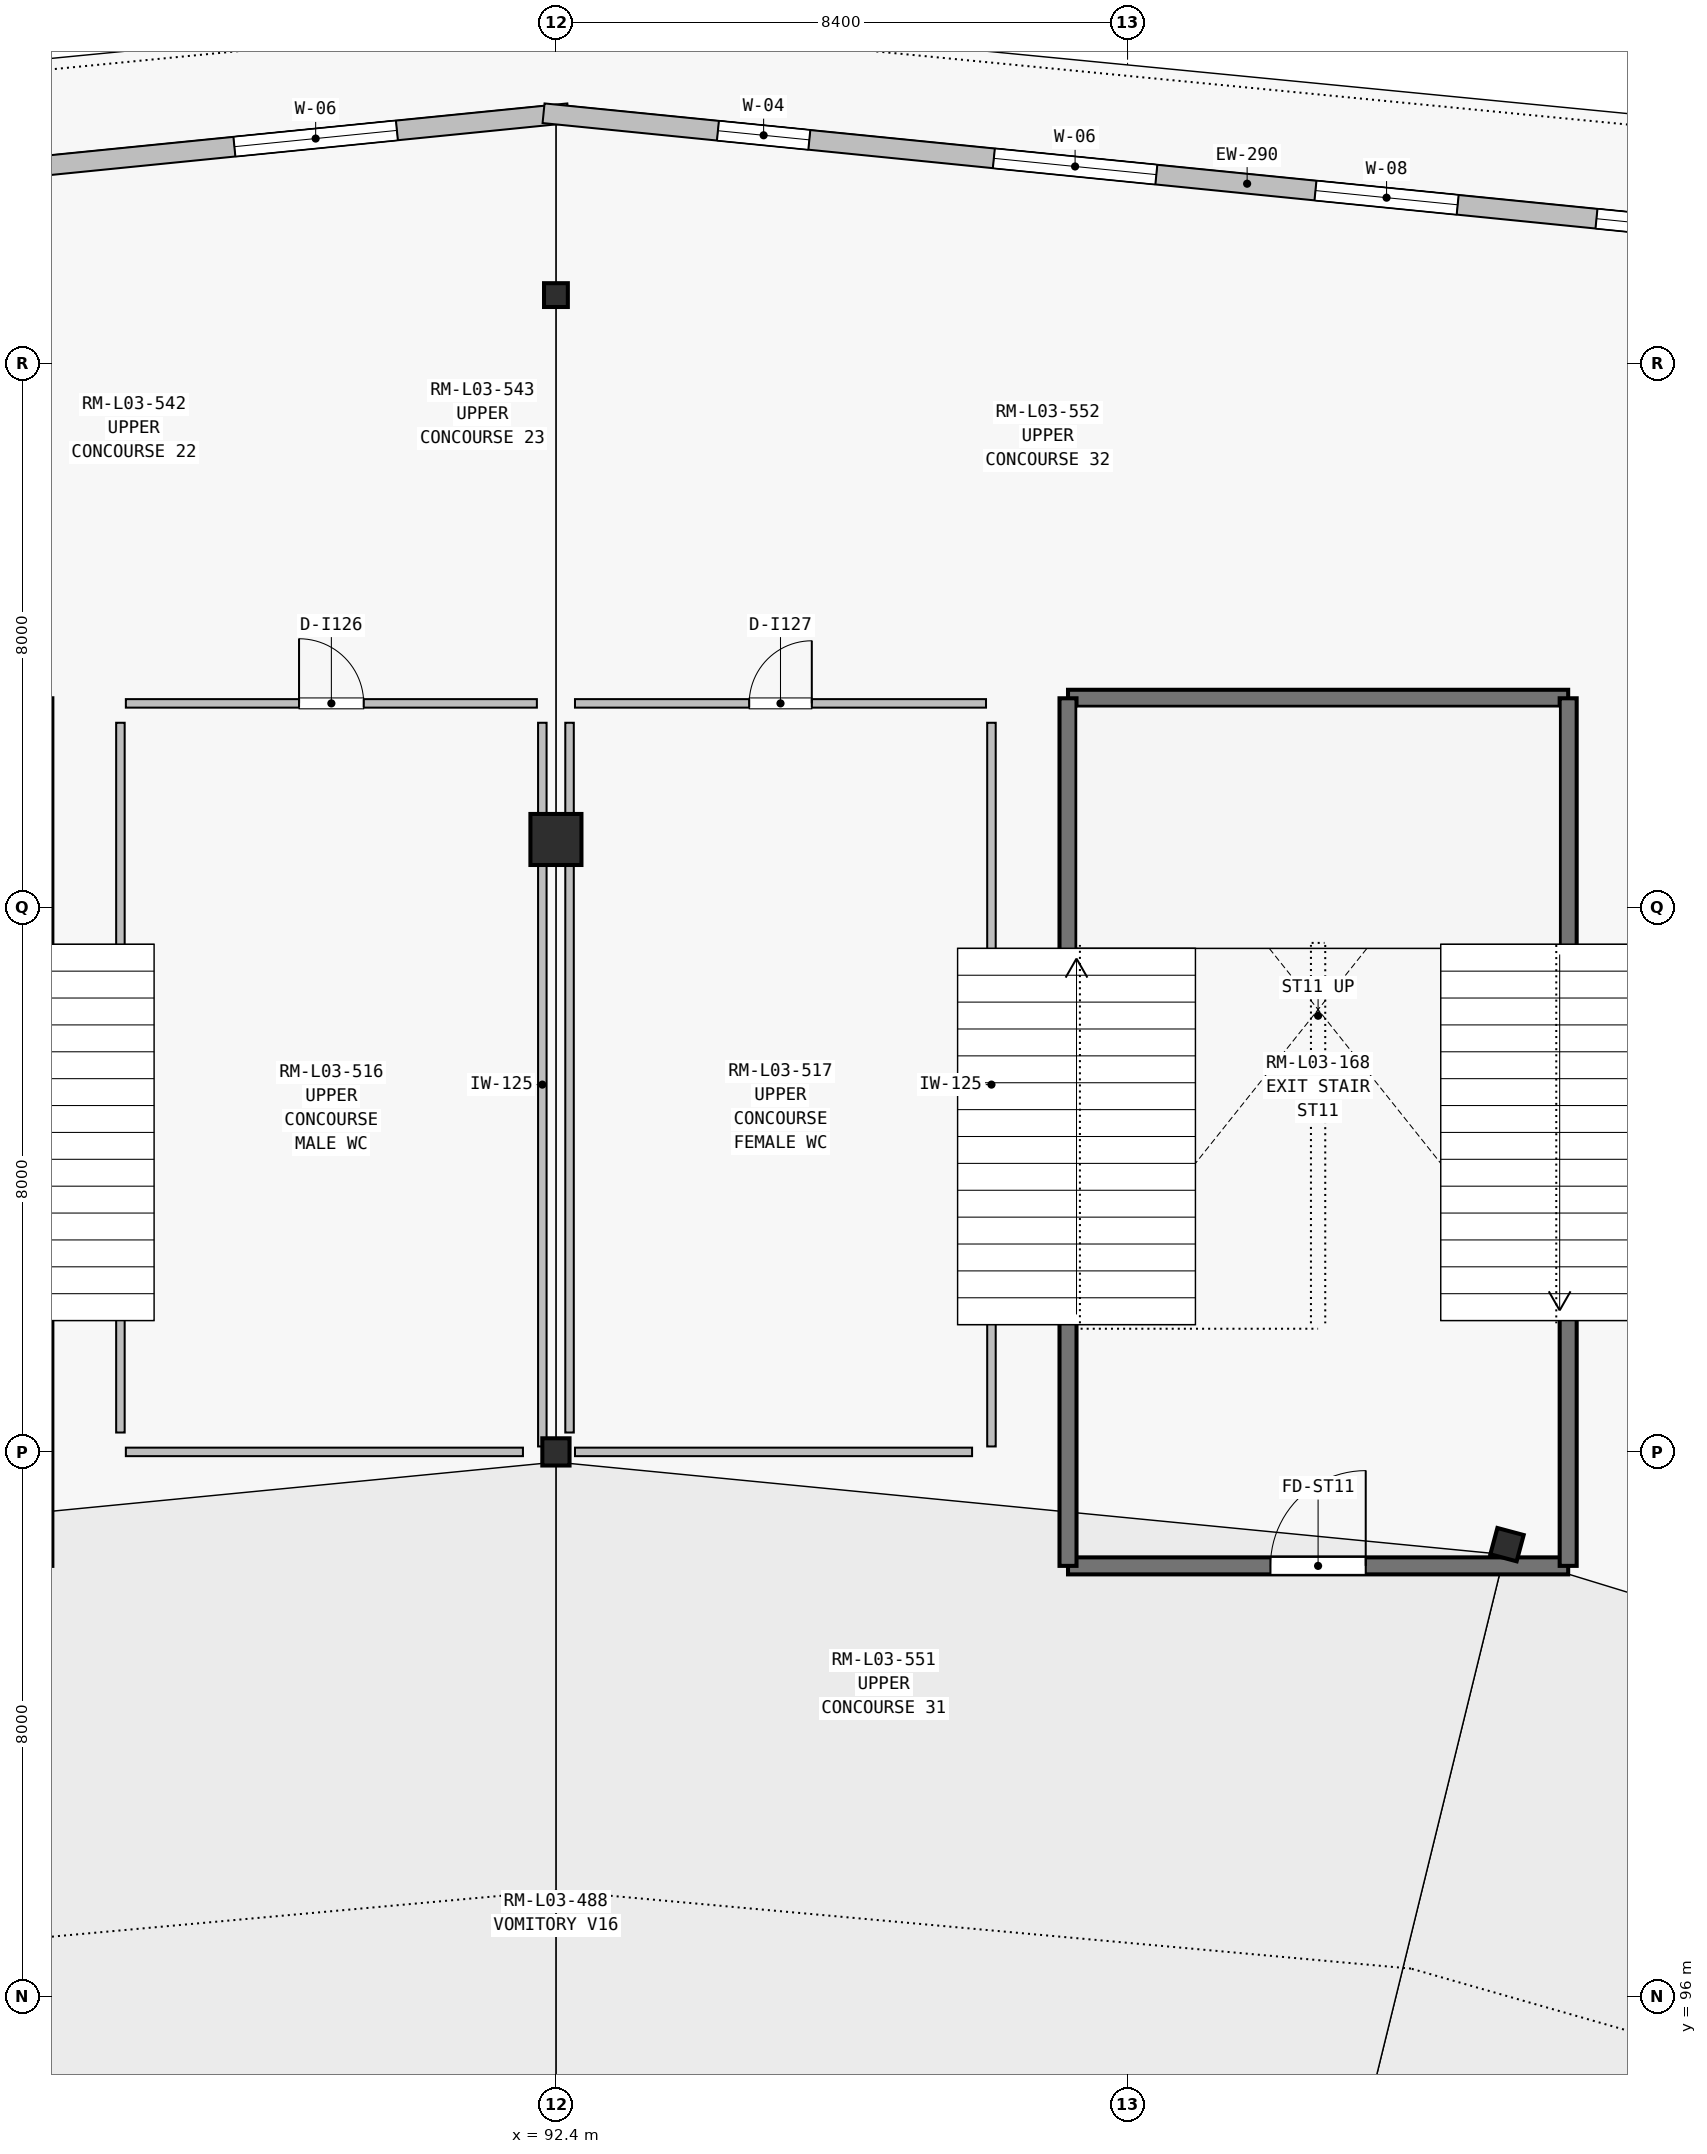
"""IFC4 building model, lengths in metres.
Left out: names, types, materials, properties, quantities, classifications, styles, units other than length and angle.
Written with IfcOpenShell. Run it as: python <this file> out.ifc"""

import sys

from ifc_helpers import new_model, si_unit, direction, frame, frame_2d, origin, origin_2d, place, context, subcontext, project, spatial, rectangle, i_section, extrude, element, fill, save


model = new_model("IFC4")
c1 = context("Model", 3, precision=1e-05, world=origin(), true_north=direction((0.0, 1.0)))
c2 = subcontext(c1, "Body", "Model", "MODEL_VIEW")
j1 = project(units=[si_unit("LENGTHUNIT", "METRE"), si_unit("PLANEANGLEUNIT", "RADIAN")], contexts=[c1])
p1 = place(None, origin())
s1 = spatial("IfcSite", under=j1, at=p1, CompositionType="ELEMENT")
p2 = place(p1, origin())
s2 = spatial("IfcBuilding", under=s1, at=p2, CompositionType="ELEMENT")
p3 = place(p2, frame((0.0, 0.0, 14.4)))
s3 = spatial("IfcBuildingStorey", under=s2, at=p3, CompositionType="ELEMENT", Elevation=14.4)
for number, where, z_axis, x_axis in (
    (1, (106.376, 102.637, 0.0), (0.0, 0.0, 1.0), (0.259, 0.966, 0.0)),
    (2, (92.4, 104.0, 0.0), (0.0, 0.0, 1.0), (0.0, 1.0, 0.0)),
):
    element("IfcColumn", number, at=place(p3, frame(where, z_axis=z_axis, x_axis=x_axis)), inside=s3, PredefinedType="COLUMN", context=c2, shape_type="SweptSolid", body=[
        extrude(i_section(OverallWidth=0.4, OverallDepth=0.4, WebThickness=0.016, FlangeThickness=0.028, at=origin_2d()), origin(), (0.0, 0.0, 1.0), 4.5),
    ])
p4 = place(p3, frame((92.4, 113.0, 0.0), z_axis=(0.0, 0.0, 1.0), x_axis=(0.0, 1.0, 0.0)))
e3 = element("IfcColumn", 3, at=p4, inside=s3, PredefinedType="COLUMN", context=c2, shape_type="SweptSolid", body=[
    extrude(rectangle(XDim=0.75, YDim=0.75, at=origin_2d()), origin(), (0.0, 0.0, 1.0), 4.5),
])
p5 = place(p3, frame((92.4, 121.0, 0.0), z_axis=(0.0, 0.0, 1.0), x_axis=(0.0, 1.0, 0.0)))
e4 = element("IfcColumn", 4, at=p5, inside=s3, PredefinedType="COLUMN", context=c2, shape_type="SweptSolid", body=[
    extrude(i_section(OverallWidth=0.35, OverallDepth=0.35, WebThickness=0.014, FlangeThickness=0.024, at=origin_2d()), origin(), (0.0, 0.0, 1.0), 4.5),
])
p6 = place(p3, frame((71.904, 121.601, 0.0), z_axis=(0.0, 0.0, 1.0), x_axis=(0.995020542998, 0.099670050731, 0.0)))
e5 = element("IfcWall", 5, at=p6, inside=s3, PredefinedType="SOLIDWALL", context=c2, shape_type="SweptSolid", body=[
    extrude(rectangle(XDim=20.781, YDim=0.29, at=frame_2d((10.391, 0.0))), origin(), (0.0, 0.0, 1.0), 4.26),
])
p7 = place(p6, frame((2.525, 0.0, 0.9)))
e6 = element("IfcOpeningElement", 6, at=p7, cuts=e5, PredefinedType="OPENING", context=c2, shape_type="SweptSolid", body=[
    extrude(rectangle(XDim=1.45, YDim=1.4, at=frame_2d((0.725, 0.7))), frame((0.0, 0.155, 0.0), z_axis=(0.0, -1.0, 0.0), x_axis=(1.0, 0.0, 0.0)), (0.0, 0.0, 1.0), 0.31),
])
p8 = place(p6, frame((7.025, 0.0, 0.75)))
e7 = element("IfcOpeningElement", 7, at=p8, cuts=e5, PredefinedType="OPENING", context=c2, shape_type="SweptSolid", body=[
    extrude(rectangle(XDim=1.65, YDim=2.4, at=frame_2d((0.825, 1.2))), frame((0.0, 0.155, 0.0), z_axis=(0.0, -1.0, 0.0), x_axis=(1.0, 0.0, 0.0)), (0.0, 0.0, 1.0), 0.31),
])
p9 = place(p6, frame((11.775, 0.0, 0.75)))
e8 = element("IfcOpeningElement", 8, at=p9, cuts=e5, PredefinedType="OPENING", context=c2, shape_type="SweptSolid", body=[
    extrude(rectangle(XDim=1.35, YDim=2.3, at=frame_2d((0.675, 1.15))), frame((0.0, 0.155, 0.0), z_axis=(0.0, -1.0, 0.0), x_axis=(1.0, 0.0, 0.0)), (0.0, 0.0, 1.0), 0.31),
])
p10 = place(p6, frame((15.85, 0.0, 0.9)))
e9 = element("IfcOpeningElement", 9, at=p10, cuts=e5, PredefinedType="OPENING", context=c2, shape_type="SweptSolid", body=[
    extrude(rectangle(XDim=2.4, YDim=2.1, at=frame_2d((1.2, 1.05))), frame((0.0, 0.155, 0.0), z_axis=(0.0, -1.0, 0.0), x_axis=(1.0, 0.0, 0.0)), (0.0, 0.0, 1.0), 0.31),
])
p11 = place(p3, frame((92.218, 123.673, 0.0), z_axis=(0.0, 0.0, 1.0), x_axis=(0.995020426289, -0.099671215838, 0.0)))
e10 = element("IfcWall", 10, at=p11, inside=s3, PredefinedType="SOLIDWALL", context=c2, shape_type="SweptSolid", body=[
    extrude(rectangle(XDim=20.781, YDim=0.29, at=frame_2d((10.391, 0.0))), origin(), (0.0, 0.0, 1.0), 4.26),
])
p12 = place(p11, frame((2.575, 0.0, 0.75)))
e11 = element("IfcOpeningElement", 11, at=p12, cuts=e10, PredefinedType="OPENING", context=c2, shape_type="SweptSolid", body=[
    extrude(rectangle(XDim=1.35, YDim=2.3, at=frame_2d((0.675, 1.15))), frame((0.0, 0.155, 0.0), z_axis=(0.0, -1.0, 0.0), x_axis=(1.0, 0.0, 0.0)), (0.0, 0.0, 1.0), 0.31),
])
p13 = place(p11, frame((6.65, 0.0, 0.9)))
e12 = element("IfcOpeningElement", 12, at=p13, cuts=e10, PredefinedType="OPENING", context=c2, shape_type="SweptSolid", body=[
    extrude(rectangle(XDim=2.4, YDim=2.1, at=frame_2d((1.2, 1.05))), frame((0.0, 0.155, 0.0), z_axis=(0.0, -1.0, 0.0), x_axis=(1.0, 0.0, 0.0)), (0.0, 0.0, 1.0), 0.31),
])
p14 = place(p11, frame((11.4, 0.0, 0.9)))
e13 = element("IfcOpeningElement", 13, at=p14, cuts=e10, PredefinedType="OPENING", context=c2, shape_type="SweptSolid", body=[
    extrude(rectangle(XDim=2.1, YDim=2.0, at=frame_2d((1.05, 1.0))), frame((0.0, 0.155, 0.0), z_axis=(0.0, -1.0, 0.0), x_axis=(1.0, 0.0, 0.0)), (0.0, 0.0, 1.0), 0.31),
])
p15 = place(p11, frame((15.55, 0.0, 0.9)))
e14 = element("IfcOpeningElement", 14, at=p15, cuts=e10, PredefinedType="OPENING", context=c2, shape_type="SweptSolid", body=[
    extrude(rectangle(XDim=3.0, YDim=1.6, at=frame_2d((1.5, 0.8))), frame((0.0, 0.155, 0.0), z_axis=(0.0, -1.0, 0.0), x_axis=(1.0, 0.0, 0.0)), (0.0, 0.0, 1.0), 0.31),
])
p16 = place(p3, frame((99.925, 102.325, 0.0), z_axis=(0.0, 0.0, 1.0), x_axis=(1.0, 0.0, 0.0)))
e15 = element("IfcWall", 15, at=p16, inside=s3, PredefinedType="SHEAR", context=c2, shape_type="SweptSolid", body=[
    extrude(rectangle(XDim=7.35, YDim=0.25, at=frame_2d((3.675, 0.0))), origin(), (0.0, 0.0, 1.0), 4.5),
])
p17 = place(p16, frame((2.975, 0.0, 0.0)))
e16 = element("IfcOpeningElement", 16, at=p17, cuts=e15, PredefinedType="OPENING", context=c2, shape_type="SweptSolid", body=[
    extrude(rectangle(XDim=1.4, YDim=2.2, at=frame_2d((0.7, 1.1))), frame((0.0, 0.135, 0.0), z_axis=(0.0, -1.0, 0.0), x_axis=(1.0, 0.0, 0.0)), (0.0, 0.0, 1.0), 0.27),
])
p18 = place(p3, frame((99.925, 115.075, 0.0), z_axis=(0.0, 0.0, 1.0), x_axis=(1.0, 0.0, 0.0)))
e17 = element("IfcWall", 17, at=p18, inside=s3, PredefinedType="SHEAR", context=c2, shape_type="SweptSolid", body=[
    extrude(rectangle(XDim=7.35, YDim=0.25, at=frame_2d((3.675, 0.0))), origin(), (0.0, 0.0, 1.0), 4.5),
])
for number, where, z_axis, x_axis in (
    (18, (99.925, 102.325, 0.0), (0.0, 0.0, 1.0), (0.0, 1.0, 0.0)),
    (19, (107.275, 102.325, 0.0), (0.0, 0.0, 1.0), (0.0, 1.0, 0.0)),
):
    element("IfcWall", number, at=place(p3, frame(where, z_axis=z_axis, x_axis=x_axis)), inside=s3, PredefinedType="SHEAR", context=c2, shape_type="SweptSolid", body=[
        extrude(rectangle(XDim=12.75, YDim=0.25, at=frame_2d((6.375, 0.0))), origin(), (0.0, 0.0, 1.0), 4.5),
    ])
p19 = place(p3, frame((86.08, 115.0, 0.0), z_axis=(0.0, 0.0, 1.0), x_axis=(1.0, 0.0, 0.0)))
e20 = element("IfcWall", 20, at=p19, inside=s3, PredefinedType="PARTITIONING", context=c2, shape_type="SweptSolid", body=[
    extrude(rectangle(XDim=6.04, YDim=0.125, at=frame_2d((3.02, 0.0))), origin(), (0.0, 0.0, 1.0), 4.19),
])
p20 = place(p19, frame((2.545, 0.0, 0.0)))
e21 = element("IfcOpeningElement", 21, at=p20, cuts=e20, PredefinedType="OPENING", context=c2, shape_type="SweptSolid", body=[
    extrude(rectangle(XDim=0.95, YDim=2.1, at=frame_2d((0.475, 1.05))), frame((0.0, 0.073, 0.0), z_axis=(0.0, -1.0, 0.0), x_axis=(1.0, 0.0, 0.0)), (0.0, 0.0, 1.0), 0.145),
])
p21 = place(p3, frame((92.2, 114.715, 0.0), z_axis=(0.0, 0.0, 1.0), x_axis=(0.0, -1.0, 0.0)))
e22 = element("IfcWall", 22, at=p21, inside=s3, PredefinedType="PARTITIONING", context=c2, shape_type="SweptSolid", body=[
    extrude(rectangle(XDim=10.635, YDim=0.125, at=frame_2d((5.317, 0.0))), origin(), (0.0, 0.0, 1.0), 2.943),
])
p22 = place(p3, frame((91.915, 104.0, 0.0), z_axis=(0.0, 0.0, 1.0), x_axis=(-1.0, 0.0, 0.0)))
e23 = element("IfcWall", 23, at=p22, inside=s3, PredefinedType="PARTITIONING", context=c2, shape_type="SweptSolid", body=[
    extrude(rectangle(XDim=5.835, YDim=0.125, at=frame_2d((2.917, 0.0))), origin(), (0.0, 0.0, 1.0), 2.943),
])
p23 = place(p3, frame((86.0, 104.285, 0.0), z_axis=(0.0, 0.0, 1.0), x_axis=(0.0, 1.0, 0.0)))
e24 = element("IfcWall", 24, at=p23, inside=s3, PredefinedType="PARTITIONING", context=c2, shape_type="SweptSolid", body=[
    extrude(rectangle(XDim=10.43, YDim=0.125, at=frame_2d((5.215, 0.0))), origin(), (0.0, 0.0, 1.0), 4.19),
])
p24 = place(p3, frame((92.68, 115.0, 0.0), z_axis=(0.0, 0.0, 1.0), x_axis=(1.0, 0.0, 0.0)))
e25 = element("IfcWall", 25, at=p24, inside=s3, PredefinedType="PARTITIONING", context=c2, shape_type="SweptSolid", body=[
    extrude(rectangle(XDim=6.04, YDim=0.125, at=frame_2d((3.02, 0.0))), origin(), (0.0, 0.0, 1.0), 4.2),
])
p25 = place(p24, frame((2.56, 0.0, 0.0)))
e26 = element("IfcOpeningElement", 26, at=p25, cuts=e25, PredefinedType="OPENING", context=c2, shape_type="SweptSolid", body=[
    extrude(rectangle(XDim=0.92, YDim=2.1, at=frame_2d((0.46, 1.05))), frame((0.0, 0.073, 0.0), z_axis=(0.0, -1.0, 0.0), x_axis=(1.0, 0.0, 0.0)), (0.0, 0.0, 1.0), 0.145),
])
p26 = place(p3, frame((98.8, 114.715, 0.0), z_axis=(0.0, 0.0, 1.0), x_axis=(0.0, -1.0, 0.0)))
e27 = element("IfcWall", 27, at=p26, inside=s3, PredefinedType="PARTITIONING", context=c2, shape_type="SweptSolid", body=[
    extrude(rectangle(XDim=10.635, YDim=0.125, at=frame_2d((5.317, 0.0))), origin(), (0.0, 0.0, 1.0), 4.2),
])
p27 = place(p3, frame((98.515, 104.0, 0.0), z_axis=(0.0, 0.0, 1.0), x_axis=(-1.0, 0.0, 0.0)))
e28 = element("IfcWall", 28, at=p27, inside=s3, PredefinedType="PARTITIONING", context=c2, shape_type="SweptSolid", body=[
    extrude(rectangle(XDim=5.835, YDim=0.125, at=frame_2d((2.917, 0.0))), origin(), (0.0, 0.0, 1.0), 2.943),
])
p28 = place(p3, frame((92.6, 104.285, 0.0), z_axis=(0.0, 0.0, 1.0), x_axis=(0.0, 1.0, 0.0)))
e29 = element("IfcWall", 29, at=p28, inside=s3, PredefinedType="PARTITIONING", context=c2, shape_type="SweptSolid", body=[
    extrude(rectangle(XDim=10.43, YDim=0.125, at=frame_2d((5.215, 0.0))), origin(), (0.0, 0.0, 1.0), 3.705),
])
p29 = place(p10, origin())
e30 = element("IfcWindow", 30, at=p29, inside=s3, PartitioningType="SINGLE_PANEL", PredefinedType="WINDOW", context=c2, shape_type="SweptSolid", body=[
    extrude(rectangle(XDim=2.4, YDim=2.1, at=frame_2d((1.2, 1.05))), frame((0.0, 0.03, 0.0), z_axis=(0.0, -1.0, 0.0), x_axis=(1.0, 0.0, 0.0)), (0.0, 0.0, 1.0), 0.06),
])
fill(e9, e30)
p30 = place(p12, origin())
e31 = element("IfcWindow", 31, at=p30, inside=s3, PartitioningType="SINGLE_PANEL", PredefinedType="WINDOW", context=c2, shape_type="SweptSolid", body=[
    extrude(rectangle(XDim=1.35, YDim=2.3, at=frame_2d((0.675, 1.15))), frame((0.0, 0.03, 0.0), z_axis=(0.0, -1.0, 0.0), x_axis=(1.0, 0.0, 0.0)), (0.0, 0.0, 1.0), 0.06),
])
fill(e11, e31)
p31 = place(p13, origin())
e32 = element("IfcWindow", 32, at=p31, inside=s3, PartitioningType="SINGLE_PANEL", PredefinedType="WINDOW", context=c2, shape_type="SweptSolid", body=[
    extrude(rectangle(XDim=2.4, YDim=2.1, at=frame_2d((1.2, 1.05))), frame((0.0, 0.03, 0.0), z_axis=(0.0, -1.0, 0.0), x_axis=(1.0, 0.0, 0.0)), (0.0, 0.0, 1.0), 0.06),
])
fill(e12, e32)
p32 = place(p14, origin())
e33 = element("IfcWindow", 33, at=p32, inside=s3, PartitioningType="SINGLE_PANEL", PredefinedType="WINDOW", context=c2, shape_type="SweptSolid", body=[
    extrude(rectangle(XDim=2.1, YDim=2.0, at=frame_2d((1.05, 1.0))), frame((0.0, 0.03, 0.0), z_axis=(0.0, -1.0, 0.0), x_axis=(1.0, 0.0, 0.0)), (0.0, 0.0, 1.0), 0.06),
])
fill(e13, e33)
p33 = place(p15, origin())
e34 = element("IfcWindow", 34, at=p33, inside=s3, PartitioningType="SINGLE_PANEL", PredefinedType="WINDOW", context=c2, shape_type="SweptSolid", body=[
    extrude(rectangle(XDim=3.0, YDim=1.6, at=frame_2d((1.5, 0.8))), frame((0.0, 0.03, 0.0), z_axis=(0.0, -1.0, 0.0), x_axis=(1.0, 0.0, 0.0)), (0.0, 0.0, 1.0), 0.06),
])
fill(e14, e34)
p34 = place(p17, origin())
e35 = element("IfcDoor", 35, at=p34, inside=s3, OperationType="SINGLE_SWING_RIGHT", PredefinedType="DOOR", context=c2, shape_type="SweptSolid", body=[
    extrude(rectangle(XDim=1.4, YDim=2.2, at=frame_2d((0.7, 1.1))), frame((0.0, 0.025, 0.0), z_axis=(0.0, -1.0, 0.0), x_axis=(1.0, 0.0, 0.0)), (0.0, 0.0, 1.0), 0.05),
])
fill(e16, e35)
p35 = place(p20, origin())
e36 = element("IfcDoor", 36, at=p35, inside=s3, OperationType="SINGLE_SWING_LEFT", PredefinedType="DOOR", context=c2, shape_type="SweptSolid", body=[
    extrude(rectangle(XDim=0.95, YDim=2.1, at=frame_2d((0.475, 1.05))), frame((0.0, 0.025, 0.0), z_axis=(0.0, -1.0, 0.0), x_axis=(1.0, 0.0, 0.0)), (0.0, 0.0, 1.0), 0.05),
])
fill(e21, e36)
p36 = place(p25, origin())
e37 = element("IfcDoor", 37, at=p36, inside=s3, OperationType="SINGLE_SWING_RIGHT", PredefinedType="DOOR", context=c2, shape_type="SweptSolid", body=[
    extrude(rectangle(XDim=0.92, YDim=2.1, at=frame_2d((0.46, 1.05))), frame((0.0, 0.025, 0.0), z_axis=(0.0, -1.0, 0.0), x_axis=(1.0, 0.0, 0.0)), (0.0, 0.0, 1.0), 0.05),
])
fill(e26, e37)
save(model, sys.argv[1])
